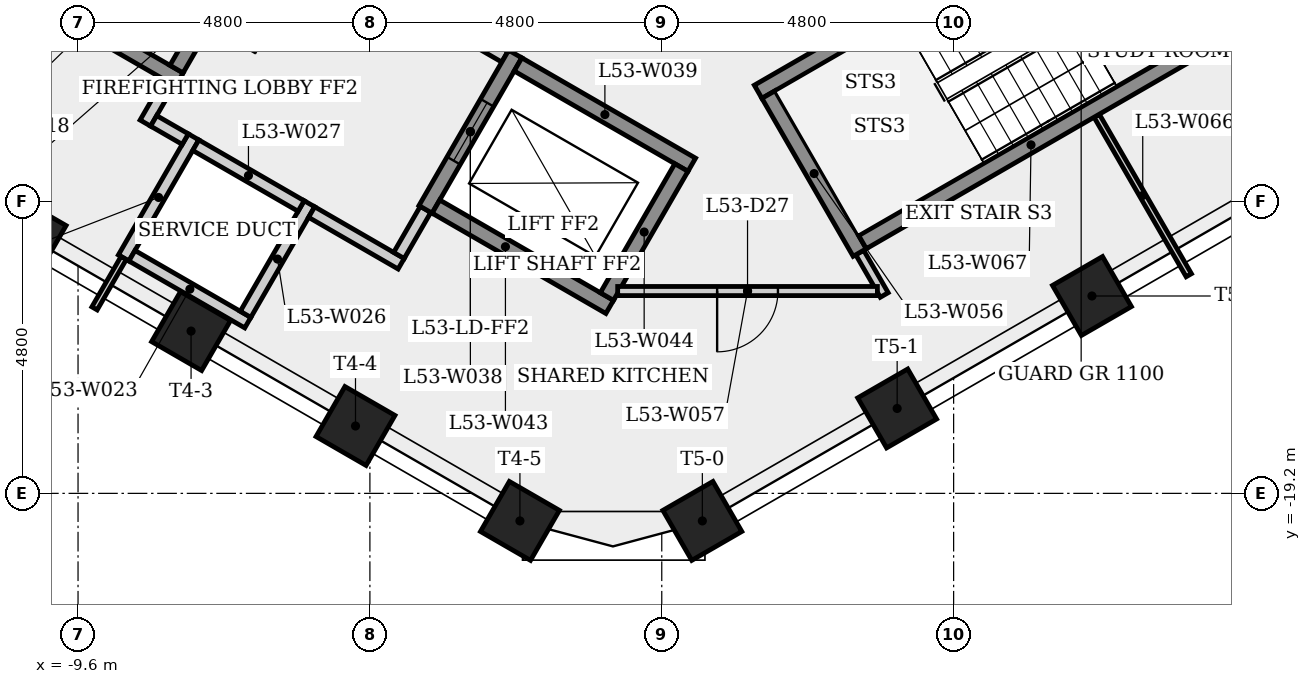
"""IFC4 building model, lengths in metres.
Left out: names, types, materials, properties, quantities, classifications, styles, units other than length and angle.
Written with IfcOpenShell. Run it as: python <this file> out.ifc"""

import sys

from ifc_helpers import new_model, si_unit, direction, frame, frame_2d, origin, origin_2d, place, context, subcontext, project, spatial, rectangle, extrude, element, fill, save


model = new_model("IFC4")
c1 = context("Model", 3, precision=1e-05, world=origin(), true_north=direction((0.0, 1.0)))
c2 = subcontext(c1, "Body", "Model", "MODEL_VIEW")
j1 = project(units=[si_unit("LENGTHUNIT", "METRE"), si_unit("PLANEANGLEUNIT", "RADIAN")], contexts=[c1])
p1 = place(None, origin())
s1 = spatial("IfcSite", under=j1, at=p1, CompositionType="ELEMENT")
p2 = place(p1, origin())
s2 = spatial("IfcBuilding", under=s1, at=p2, CompositionType="ELEMENT")
p3 = place(p2, frame((0.0, 0.0, 198.7)))
s3 = spatial("IfcBuildingStorey", under=s2, at=p3, CompositionType="ELEMENT", Elevation=198.7)
for number, where, z_axis, x_axis in (
    (1, (-10.445, -14.969, 0.0), (0.0, 0.0, 1.0), (-0.5, -0.866, 0.0)),
    (2, (-7.741, -16.531, 0.0), (0.0, 0.0, 1.0), (-0.5, -0.866, 0.0)),
    (3, (-5.037, -18.092, 0.0), (0.0, 0.0, 1.0), (-0.5, -0.866, 0.0)),
    (4, (-2.333, -19.653, 0.0), (0.0, 0.0, 1.0), (-0.5, -0.866, 0.0)),
    (5, (0.667, -19.653, 0.0), (0.0, 0.0, 1.0), (0.5, -0.866, 0.0)),
    (6, (3.871, -17.803, 0.0), (0.0, 0.0, 1.0), (0.5, -0.866, 0.0)),
    (7, (7.075, -15.954, 0.0), (0.0, 0.0, 1.0), (0.5, -0.866, 0.0)),
):
    element("IfcColumn", number, at=place(p3, frame(where, z_axis=z_axis, x_axis=x_axis)), inside=s3, PredefinedType="COLUMN", context=c2, shape_type="SweptSolid", body=[
        extrude(rectangle(XDim=0.95, YDim=0.95, at=origin_2d()), origin(), (0.0, 0.0, 1.0), 3.4),
    ])
p4 = place(p3, frame((-8.85, -15.329, 0.0), z_axis=(0.0, 0.0, 1.0), x_axis=(0.500077740698, 0.865980515519, 0.0)))
e8 = element("IfcWall", 8, at=p4, inside=s3, PredefinedType="PLUMBINGWALL", context=c2, shape_type="SweptSolid", body=[
    extrude(rectangle(XDim=2.3, YDim=0.2, at=frame_2d((1.15, 0.0))), origin(), (0.0, 0.0, 1.0), 3.0),
])
p5 = place(p3, frame((-8.85, -15.329, 0.0), z_axis=(0.0, 0.0, 1.0), x_axis=(-0.499950501706, -0.866053979752, 0.0)))
e9 = element("IfcWall", 9, at=p5, inside=s3, PredefinedType="PARTITIONING", context=c2, shape_type="SweptSolid", body=[
    extrude(rectangle(XDim=0.958, YDim=0.1, at=frame_2d((0.479, 0.0))), origin(), (0.0, 0.0, 1.0), 3.0),
])
p6 = place(p3, frame((-8.493, -13.11, 0.0), z_axis=(0.0, 0.0, 1.0), x_axis=(0.500067724834, 0.865986299303, 0.0)))
e10 = element("IfcWall", 10, at=p6, inside=s3, PredefinedType="PARTITIONING", context=c2, shape_type="SweptSolid", body=[
    extrude(rectangle(XDim=0.775, YDim=0.2, at=frame_2d((0.388, 0.0))), origin(), (0.0, 0.0, 1.0), 3.0),
])
p7 = place(p3, frame((-7.935, -12.393, 0.0), z_axis=(0.0, 0.0, 1.0), x_axis=(-0.866025499775, 0.499999833739, 0.0)))
e11 = element("IfcWall", 11, at=p7, inside=s3, PredefinedType="SHEAR", context=c2, shape_type="SweptSolid", body=[
    extrude(rectangle(XDim=6.4, YDim=0.25, at=frame_2d((3.2, 0.0))), origin(), (0.0, 0.0, 1.0), 3.0),
])
p8 = place(p3, frame((-7.836, -13.373, 0.0), z_axis=(0.0, 0.0, 1.0), x_axis=(-0.866232998003, 0.499640263761, 0.0)))
e12 = element("IfcWall", 12, at=p8, inside=s3, PredefinedType="PARTITIONING", context=c2, shape_type="SweptSolid", body=[
    extrude(rectangle(XDim=0.6, YDim=0.2, at=frame_2d((0.3, 0.0))), origin(), (0.0, 0.0, 1.0), 3.0),
])
p9 = place(p3, frame((-6.808, -16.392, 0.0), z_axis=(0.0, 0.0, 1.0), x_axis=(-0.866008176907, 0.50002983664, 0.0)))
e13 = element("IfcWall", 13, at=p9, inside=s3, PredefinedType="PLUMBINGWALL", context=c2, shape_type="SweptSolid", body=[
    extrude(rectangle(XDim=2.2, YDim=0.2, at=frame_2d((1.1, 0.0))), origin(), (0.0, 0.0, 1.0), 3.0),
])
p10 = place(p3, frame((-6.605, -9.841, 0.0), z_axis=(0.0, 0.0, 1.0), x_axis=(-0.499996545922, -0.866027397988, 0.0)))
e14 = element("IfcWall", 14, at=p10, inside=s3, PredefinedType="SHEAR", context=c2, shape_type="SweptSolid", body=[
    extrude(rectangle(XDim=2.75, YDim=0.25, at=frame_2d((1.375, 0.0))), origin(), (0.0, 0.0, 1.0), 3.0),
])
p11 = place(p10, frame((0.875, 0.0, 0.0)))
e15 = element("IfcOpeningElement", 15, at=p11, cuts=e14, PredefinedType="OPENING", context=c2, shape_type="SweptSolid", body=[
    extrude(rectangle(XDim=1.0, YDim=2.1, at=frame_2d((0.5, 1.05))), frame((0.0, 0.135, 0.0), z_axis=(0.0, -1.0, 0.0), x_axis=(1.0, 0.0, 0.0)), (0.0, 0.0, 1.0), 0.27),
])
p12 = place(p3, frame((-6.435, -9.795, 0.0), z_axis=(0.0, 0.0, 1.0), x_axis=(0.866012907634, -0.500021643343, 0.0)))
e16 = element("IfcWall", 16, at=p12, inside=s3, PredefinedType="PARTITIONING", context=c2, shape_type="SweptSolid", body=[
    extrude(rectangle(XDim=4.45, YDim=0.2, at=frame_2d((2.225, 0.0))), origin(), (0.0, 0.0, 1.0), 3.0),
])
p13 = place(p12, frame((1.675, 0.0, 0.0)))
e17 = element("IfcOpeningElement", 17, at=p13, cuts=e16, PredefinedType="OPENING", context=c2, shape_type="SweptSolid", body=[
    extrude(rectangle(XDim=1.1, YDim=2.1, at=frame_2d((0.55, 1.05))), frame((0.0, 0.11, 0.0), z_axis=(0.0, -1.0, 0.0), x_axis=(1.0, 0.0, 0.0)), (0.0, 0.0, 1.0), 0.22),
])
p14 = place(p3, frame((-5.795, -14.437, 0.0), z_axis=(0.0, 0.0, 1.0), x_axis=(-0.500027713859, -0.866009402589, 0.0)))
e18 = element("IfcWall", 18, at=p14, inside=s3, PredefinedType="PLUMBINGWALL", context=c2, shape_type="SweptSolid", body=[
    extrude(rectangle(XDim=2.1, YDim=0.2, at=frame_2d((1.05, 0.0))), origin(), (0.0, 0.0, 1.0), 3.0),
])
p15 = place(p3, frame((-5.931, -14.473, 0.0), z_axis=(0.0, 0.0, 1.0), x_axis=(-0.866041268327, 0.499972520799, 0.0)))
e19 = element("IfcWall", 19, at=p15, inside=s3, PredefinedType="PLUMBINGWALL", context=c2, shape_type="SweptSolid", body=[
    extrude(rectangle(XDim=2.0, YDim=0.2, at=frame_2d((1.0, 0.0))), origin(), (0.0, 0.0, 1.0), 3.0),
])
p16 = place(p3, frame((-4.286, -15.423, 0.0), z_axis=(0.0, 0.0, 1.0), x_axis=(-0.866025371046, 0.500000056704, 0.0)))
e20 = element("IfcWall", 20, at=p16, inside=s3, PredefinedType="PARTITIONING", context=c2, shape_type="SweptSolid", body=[
    extrude(rectangle(XDim=1.7, YDim=0.2, at=frame_2d((0.85, 0.0))), origin(), (0.0, 0.0, 1.0), 3.0),
])
p17 = place(p3, frame((-3.885, -14.529, 0.0), z_axis=(0.0, 0.0, 1.0), x_axis=(-0.499859285417, -0.866106630146, 0.0)))
e21 = element("IfcWall", 21, at=p17, inside=s3, PredefinedType="PARTITIONING", context=c2, shape_type="SweptSolid", body=[
    extrude(rectangle(XDim=0.875, YDim=0.2, at=frame_2d((0.438, 0.0))), origin(), (0.0, 0.0, 1.0), 3.0),
])
p18 = place(p3, frame((-2.41, -11.974, 0.0), z_axis=(0.0, 0.0, 1.0), x_axis=(-0.500001826776, -0.866024349092, 0.0)))
e22 = element("IfcWall", 22, at=p18, inside=s3, PredefinedType="SHEAR", context=c2, shape_type="SweptSolid", body=[
    extrude(rectangle(XDim=2.95, YDim=0.25, at=frame_2d((1.475, 0.0))), origin(), (0.0, 0.0, 1.0), 3.0),
])
p19 = place(p18, frame((0.925, 0.0, 0.0)))
e23 = element("IfcOpeningElement", 23, at=p19, cuts=e22, PredefinedType="OPENING", context=c2, shape_type="SweptSolid", body=[
    extrude(rectangle(XDim=1.1, YDim=2.1, at=frame_2d((0.55, 1.05))), frame((0.0, 0.135, 0.0), z_axis=(0.0, -1.0, 0.0), x_axis=(1.0, 0.0, 0.0)), (0.0, 0.0, 1.0), 0.27),
])
p20 = place(p3, frame((-2.364, -12.145, 0.0), z_axis=(0.0, 0.0, 1.0), x_axis=(0.866040211805, -0.499974350878, 0.0)))
e24 = element("IfcWall", 24, at=p20, inside=s3, PredefinedType="SHEAR", context=c2, shape_type="SweptSolid", body=[
    extrude(rectangle(XDim=3.3, YDim=0.25, at=frame_2d((1.65, 0.0))), origin(), (0.0, 0.0, 1.0), 3.0),
])
p21 = place(p3, frame((-0.856, -16.133, 0.0), z_axis=(0.0, 0.0, 1.0), x_axis=(-0.866021716278, 0.500006386895, 0.0)))
e25 = element("IfcWall", 25, at=p21, inside=s3, PredefinedType="SHEAR", context=c2, shape_type="SweptSolid", body=[
    extrude(rectangle(XDim=3.3, YDim=0.25, at=frame_2d((1.65, 0.0))), origin(), (0.0, 0.0, 1.0), 3.0),
])
p22 = place(p3, frame((-0.902, -15.962, 0.0), z_axis=(0.0, 0.0, 1.0), x_axis=(0.500061746146, 0.865989751695, 0.0)))
e26 = element("IfcWall", 26, at=p22, inside=s3, PredefinedType="SHEAR", context=c2, shape_type="SweptSolid", body=[
    extrude(rectangle(XDim=2.45, YDim=0.25, at=frame_2d((1.225, 0.0))), origin(), (0.0, 0.0, 1.0), 3.4),
])
p23 = place(p3, frame((1.585, -12.595, 0.0), z_axis=(0.0, 0.0, 1.0), x_axis=(0.866036417653, 0.499980922934, 0.0)))
e27 = element("IfcWall", 27, at=p23, inside=s3, PredefinedType="SHEAR", context=c2, shape_type="SweptSolid", body=[
    extrude(rectangle(XDim=6.65, YDim=0.25, at=frame_2d((3.325, 0.0))), origin(), (0.0, 0.0, 1.0), 3.0),
])
p24 = place(p23, frame((5.275, 0.0, 0.0)))
e28 = element("IfcOpeningElement", 28, at=p24, cuts=e27, PredefinedType="OPENING", context=c2, shape_type="SweptSolid", body=[
    extrude(rectangle(XDim=1.0, YDim=2.1, at=frame_2d((0.5, 1.05))), frame((0.0, 0.135, 0.0), z_axis=(0.0, -1.0, 0.0), x_axis=(1.0, 0.0, 0.0)), (0.0, 0.0, 1.0), 0.27),
])
p25 = place(p3, frame((3.256, -15.239, 0.0), z_axis=(0.0, 0.0, 1.0), x_axis=(0.499818546685, -0.866130140562, 0.0)))
e29 = element("IfcWall", 29, at=p25, inside=s3, PredefinedType="PARTITIONING", context=c2, shape_type="SweptSolid", body=[
    extrude(rectangle(XDim=0.806, YDim=0.15, at=frame_2d((0.403, 0.0))), origin(), (0.0, 0.0, 1.0), 3.0),
])
p26 = place(p3, frame((3.256, -15.239, 0.0), z_axis=(0.0, 0.0, 1.0), x_axis=(-0.50002537861, 0.866010750942, 0.0)))
e30 = element("IfcWall", 30, at=p26, inside=s3, PredefinedType="SHEAR", context=c2, shape_type="SweptSolid", body=[
    extrude(rectangle(XDim=3.0, YDim=0.25, at=frame_2d((1.5, 0.0))), origin(), (0.0, 0.0, 1.0), 3.0),
])
p27 = place(p3, frame((3.546, -15.872, 0.0), z_axis=(0.0, 0.0, 1.0), x_axis=(-1.0, 0.0, 0.0)))
e31 = element("IfcWall", 31, at=p27, inside=s3, PredefinedType="PARTITIONING", context=c2, shape_type="SweptSolid", body=[
    extrude(rectangle(XDim=4.271, YDim=0.15, at=frame_2d((2.136, 0.0))), origin(), (0.0, 0.0, 1.0), 3.0),
])
p28 = place(p27, frame((1.636, 0.0, 0.0)))
e32 = element("IfcOpeningElement", 32, at=p28, cuts=e31, PredefinedType="OPENING", context=c2, shape_type="SweptSolid", body=[
    extrude(rectangle(XDim=1.0, YDim=2.1, at=frame_2d((0.5, 1.05))), frame((0.0, 0.085, 0.0), z_axis=(0.0, -1.0, 0.0), x_axis=(1.0, 0.0, 0.0)), (0.0, 0.0, 1.0), 0.17),
])
p29 = place(p3, frame((7.153, -12.989, 0.0), z_axis=(0.0, 0.0, 1.0), x_axis=(0.500013093982, -0.866017843839, 0.0)))
e33 = element("IfcWall", 33, at=p29, inside=s3, PredefinedType="PARTITIONING", context=c2, shape_type="SweptSolid", body=[
    extrude(rectangle(XDim=3.03, YDim=0.1, at=frame_2d((1.515, 0.0))), origin(), (0.0, 0.0, 1.0), 3.0),
])
p30 = place(p3, frame((3.301, -15.068, 0.0), z_axis=(0.0, 0.0, 1.0), x_axis=(0.866035036182, 0.499983315828, 0.0)))
e34 = element("IfcWall", 34, at=p30, inside=s3, PredefinedType="SHEAR", context=c2, shape_type="SweptSolid", body=[
    extrude(rectangle(XDim=6.4, YDim=0.25, at=frame_2d((3.2, 0.0))), origin(), (0.0, 0.0, 1.0), 3.0),
])
p31 = place(p3, frame((10.901, -10.681, 0.0), z_axis=(0.0, 0.0, 1.0), x_axis=(-0.866007538022, -0.500030943131, 0.0)))
e35 = element("IfcWall", 35, at=p31, inside=s3, PredefinedType="PARTITIONING", context=c2, shape_type="SweptSolid", body=[
    extrude(rectangle(XDim=2.375, YDim=0.2, at=frame_2d((1.188, 0.0))), origin(), (0.0, 0.0, 1.0), 3.0),
])
p32 = place(p19, origin())
e36 = element("IfcDoor", 36, at=p32, inside=s3, OperationType="SLIDING_TO_LEFT", PredefinedType="DOOR", context=c2, shape_type="SweptSolid", body=[
    extrude(rectangle(XDim=1.1, YDim=2.1, at=frame_2d((0.55, 1.05))), frame((0.0, 0.025, 0.0), z_axis=(0.0, -1.0, 0.0), x_axis=(1.0, 0.0, 0.0)), (0.0, 0.0, 1.0), 0.05),
])
fill(e23, e36)
p33 = place(p28, origin())
e37 = element("IfcDoor", 37, at=p33, inside=s3, OperationType="SINGLE_SWING_RIGHT", PredefinedType="DOOR", context=c2, shape_type="SweptSolid", body=[
    extrude(rectangle(XDim=1.0, YDim=2.1, at=frame_2d((0.5, 1.05))), frame((0.0, 0.025, 0.0), z_axis=(0.0, -1.0, 0.0), x_axis=(1.0, 0.0, 0.0)), (0.0, 0.0, 1.0), 0.05),
])
fill(e32, e37)
save(model, sys.argv[1])
